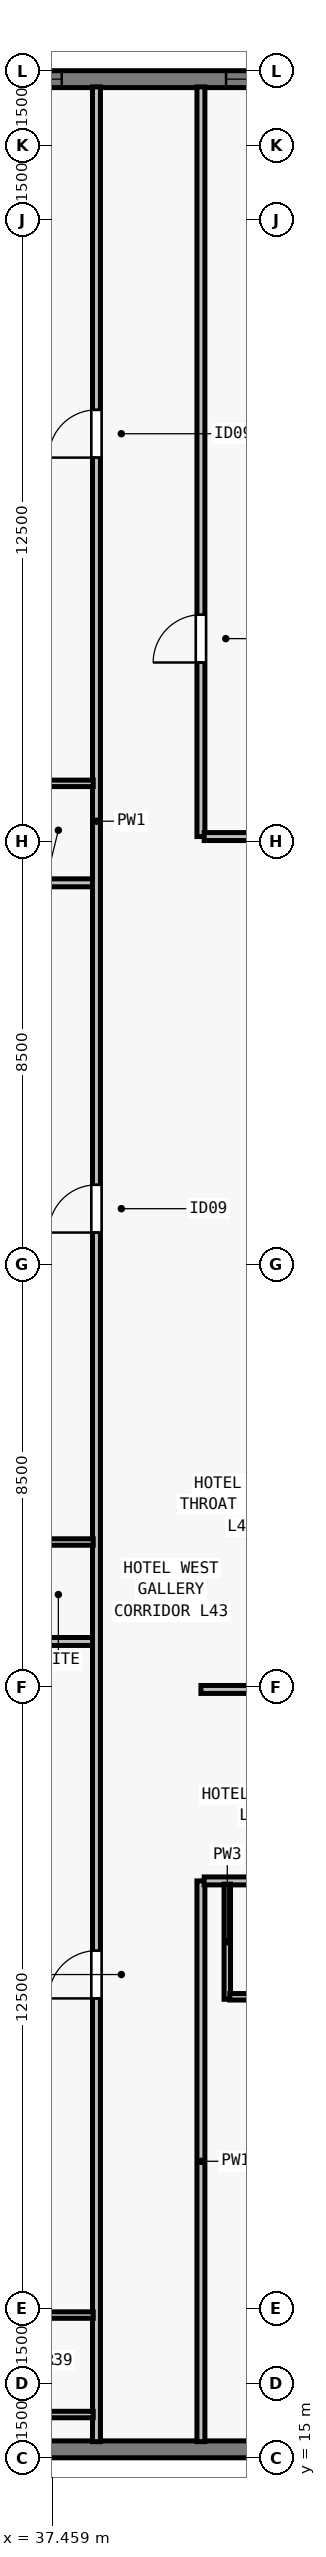
"""IFC4 building model, lengths in metres.
Left out: names, types, materials, properties, quantities, classifications, styles, units other than length and angle.
Written with IfcOpenShell. Run it as: python <this file> out.ifc"""

import sys

from ifc_helpers import new_model, si_unit, direction, frame, frame_2d, origin, place, context, subcontext, project, spatial, rectangle, extrude, element, fill, save


model = new_model("IFC4")
c1 = context("Model", 3, precision=1e-05, world=origin(), true_north=direction((0.0, 1.0)))
c2 = subcontext(c1, "Body", "Model", "MODEL_VIEW")
j1 = project(units=[si_unit("LENGTHUNIT", "METRE"), si_unit("PLANEANGLEUNIT", "RADIAN")], contexts=[c1])
p1 = place(None, origin())
s1 = spatial("IfcSite", under=j1, at=p1, CompositionType="ELEMENT")
p2 = place(p1, origin())
s2 = spatial("IfcBuilding", under=s1, at=p2, CompositionType="ELEMENT")
p3 = place(p2, frame((0.0, 0.0, 158.5)))
s3 = spatial("IfcBuildingStorey", under=s2, at=p3, CompositionType="ELEMENT", Elevation=158.5)
p4 = place(p3, frame((49.4, 15.17, 0.0), z_axis=(0.0, 0.0, 1.0), x_axis=(-1.0, 0.0, 0.0)))
e1 = element("IfcWall", 1, at=p4, inside=s3, PredefinedType="SOLIDWALL", context=c2, shape_type="SweptSolid", body=[
    extrude(rectangle(XDim=17.082, YDim=0.34, at=frame_2d((8.541, 0.0))), origin(), (0.0, 0.0, 1.0), 3.28),
])
p5 = place(p4, frame((6.566, 0.0, 0.8)))
e2 = element("IfcOpeningElement", 2, at=p5, cuts=e1, PredefinedType="OPENING", context=c2, shape_type="SweptSolid", body=[
    extrude(rectangle(XDim=1.35, YDim=1.66, at=frame_2d((0.675, 0.83))), frame((0.0, 0.18, 0.0), z_axis=(0.0, -1.0, 0.0), x_axis=(1.0, 0.0, 0.0)), (0.0, 0.0, 1.0), 0.36),
])
p6 = place(p4, frame((0.71, 0.0, 0.8)))
e3 = element("IfcOpeningElement", 3, at=p6, cuts=e1, PredefinedType="OPENING", context=c2, shape_type="SweptSolid", body=[
    extrude(rectangle(XDim=0.75, YDim=1.66, at=frame_2d((0.375, 0.83))), frame((0.0, 0.18, 0.0), z_axis=(0.0, -1.0, 0.0), x_axis=(1.0, 0.0, 0.0)), (0.0, 0.0, 1.0), 0.36),
])
p7 = place(p3, frame((32.0, 62.83, 0.0), z_axis=(0.0, 0.0, 1.0), x_axis=(1.0, 0.0, 0.0)))
e4 = element("IfcWall", 4, at=p7, inside=s3, PredefinedType="SOLIDWALL", context=c2, shape_type="SweptSolid", body=[
    extrude(rectangle(XDim=39.682, YDim=0.34, at=frame_2d((19.841, 0.0))), origin(), (0.0, 0.0, 1.0), 3.28),
])
p8 = place(p7, frame((3.902, 0.0, 0.8)))
e5 = element("IfcOpeningElement", 5, at=p8, cuts=e4, PredefinedType="OPENING", context=c2, shape_type="SweptSolid", body=[
    extrude(rectangle(XDim=1.75, YDim=1.66, at=frame_2d((0.875, 0.83))), frame((0.0, 0.18, 0.0), z_axis=(0.0, -1.0, 0.0), x_axis=(1.0, 0.0, 0.0)), (0.0, 0.0, 1.0), 0.36),
])
p9 = place(p7, frame((8.955, 0.0, 0.8)))
e6 = element("IfcOpeningElement", 6, at=p9, cuts=e4, PredefinedType="OPENING", context=c2, shape_type="SweptSolid", body=[
    extrude(rectangle(XDim=1.35, YDim=1.66, at=frame_2d((0.675, 0.83))), frame((0.0, 0.18, 0.0), z_axis=(0.0, -1.0, 0.0), x_axis=(1.0, 0.0, 0.0)), (0.0, 0.0, 1.0), 0.36),
])
p10 = place(p7, frame((11.859, 0.0, 0.8)))
e7 = element("IfcOpeningElement", 7, at=p10, cuts=e4, PredefinedType="OPENING", context=c2, shape_type="SweptSolid", body=[
    extrude(rectangle(XDim=1.75, YDim=1.66, at=frame_2d((0.875, 0.83))), frame((0.0, 0.18, 0.0), z_axis=(0.0, -1.0, 0.0), x_axis=(1.0, 0.0, 0.0)), (0.0, 0.0, 1.0), 0.36),
])
p11 = place(p7, frame((16.062, 0.0, 0.8)))
e8 = element("IfcOpeningElement", 8, at=p11, cuts=e4, PredefinedType="OPENING", context=c2, shape_type="SweptSolid", body=[
    extrude(rectangle(XDim=1.35, YDim=1.66, at=frame_2d((0.675, 0.83))), frame((0.0, 0.18, 0.0), z_axis=(0.0, -1.0, 0.0), x_axis=(1.0, 0.0, 0.0)), (0.0, 0.0, 1.0), 0.36),
])
p12 = place(p7, frame((18.966, 0.0, 0.8)))
e9 = element("IfcOpeningElement", 9, at=p12, cuts=e4, PredefinedType="OPENING", context=c2, shape_type="SweptSolid", body=[
    extrude(rectangle(XDim=1.75, YDim=1.66, at=frame_2d((0.875, 0.83))), frame((0.0, 0.18, 0.0), z_axis=(0.0, -1.0, 0.0), x_axis=(1.0, 0.0, 0.0)), (0.0, 0.0, 1.0), 0.36),
])
p13 = place(p7, frame((22.719, 0.0, 0.8)))
e10 = element("IfcOpeningElement", 10, at=p13, cuts=e4, PredefinedType="OPENING", context=c2, shape_type="SweptSolid", body=[
    extrude(rectangle(XDim=1.35, YDim=1.66, at=frame_2d((0.675, 0.83))), frame((0.0, 0.18, 0.0), z_axis=(0.0, -1.0, 0.0), x_axis=(1.0, 0.0, 0.0)), (0.0, 0.0, 1.0), 0.36),
])
p14 = place(p7, frame((26.073, 0.0, 0.8)))
e11 = element("IfcOpeningElement", 11, at=p14, cuts=e4, PredefinedType="OPENING", context=c2, shape_type="SweptSolid", body=[
    extrude(rectangle(XDim=1.75, YDim=1.66, at=frame_2d((0.875, 0.83))), frame((0.0, 0.18, 0.0), z_axis=(0.0, -1.0, 0.0), x_axis=(1.0, 0.0, 0.0)), (0.0, 0.0, 1.0), 0.36),
])
p15 = place(p7, frame((28.977, 0.0, 0.8)))
e12 = element("IfcOpeningElement", 12, at=p15, cuts=e4, PredefinedType="OPENING", context=c2, shape_type="SweptSolid", body=[
    extrude(rectangle(XDim=1.35, YDim=1.66, at=frame_2d((0.675, 0.83))), frame((0.0, 0.18, 0.0), z_axis=(0.0, -1.0, 0.0), x_axis=(1.0, 0.0, 0.0)), (0.0, 0.0, 1.0), 0.36),
])
p16 = place(p7, frame((33.18, 0.0, 0.8)))
e13 = element("IfcOpeningElement", 13, at=p16, cuts=e4, PredefinedType="OPENING", context=c2, shape_type="SweptSolid", body=[
    extrude(rectangle(XDim=1.75, YDim=1.66, at=frame_2d((0.875, 0.83))), frame((0.0, 0.18, 0.0), z_axis=(0.0, -1.0, 0.0), x_axis=(1.0, 0.0, 0.0)), (0.0, 0.0, 1.0), 0.36),
])
p17 = place(p3, frame((38.35, 15.325, 0.0), z_axis=(0.0, 0.0, 1.0), x_axis=(0.0, 1.0, 0.0)))
e14 = element("IfcWall", 14, at=p17, inside=s3, PredefinedType="PARTITIONING", context=c2, shape_type="SweptSolid", body=[
    extrude(rectangle(XDim=47.35, YDim=0.16, at=frame_2d((23.675, 0.0))), origin(), (0.0, 0.0, 1.0), 2.555),
])
p18 = place(p17, frame((8.912, 0.0, 0.0)))
e15 = element("IfcOpeningElement", 15, at=p18, cuts=e14, PredefinedType="OPENING", context=c2, shape_type="SweptSolid", body=[
    extrude(rectangle(XDim=0.96, YDim=2.15, at=frame_2d((0.48, 1.075))), frame((0.0, 0.09, 0.0), z_axis=(0.0, -1.0, 0.0), x_axis=(1.0, 0.0, 0.0)), (0.0, 0.0, 1.0), 0.18),
])
p19 = place(p17, frame((24.312, 0.0, 0.0)))
e16 = element("IfcOpeningElement", 16, at=p19, cuts=e14, PredefinedType="OPENING", context=c2, shape_type="SweptSolid", body=[
    extrude(rectangle(XDim=0.96, YDim=2.15, at=frame_2d((0.48, 1.075))), frame((0.0, 0.09, 0.0), z_axis=(0.0, -1.0, 0.0), x_axis=(1.0, 0.0, 0.0)), (0.0, 0.0, 1.0), 0.18),
])
p20 = place(p17, frame((39.895, 0.0, 0.0)))
e17 = element("IfcOpeningElement", 17, at=p20, cuts=e14, PredefinedType="OPENING", context=c2, shape_type="SweptSolid", body=[
    extrude(rectangle(XDim=0.96, YDim=2.15, at=frame_2d((0.48, 1.075))), frame((0.0, 0.09, 0.0), z_axis=(0.0, -1.0, 0.0), x_axis=(1.0, 0.0, 0.0)), (0.0, 0.0, 1.0), 0.18),
])
p21 = place(p3, frame((40.45, 15.325, 0.0), z_axis=(0.0, 0.0, 1.0), x_axis=(0.0, 1.0, 0.0)))
e18 = element("IfcWall", 18, at=p21, inside=s3, PredefinedType="PARTITIONING", context=c2, shape_type="SweptSolid", body=[
    extrude(rectangle(XDim=11.275, YDim=0.16, at=frame_2d((5.638, 0.0))), origin(), (0.0, 0.0, 1.0), 2.555),
])
p22 = place(p3, frame((40.45, 47.6, 0.0), z_axis=(0.0, 0.0, 1.0), x_axis=(0.0, 1.0, 0.0)))
e19 = element("IfcWall", 19, at=p22, inside=s3, PredefinedType="PARTITIONING", context=c2, shape_type="SweptSolid", body=[
    extrude(rectangle(XDim=15.075, YDim=0.16, at=frame_2d((7.538, 0.0))), origin(), (0.0, 0.0, 1.0), 2.555),
])
p23 = place(p22, frame((3.5, 0.0, 0.0)))
e20 = element("IfcOpeningElement", 20, at=p23, cuts=e19, PredefinedType="OPENING", context=c2, shape_type="SweptSolid", body=[
    extrude(rectangle(XDim=0.96, YDim=2.12, at=frame_2d((0.48, 1.06))), frame((0.0, 0.09, 0.0), z_axis=(0.0, -1.0, 0.0), x_axis=(1.0, 0.0, 0.0)), (0.0, 0.0, 1.0), 0.18),
])
p24 = place(p3, frame((40.45, 30.45, 0.0), z_axis=(0.0, 0.0, 1.0), x_axis=(1.0, 0.0, 0.0)))
e21 = element("IfcWall", 21, at=p24, inside=s3, PredefinedType="PARTITIONING", context=c2, shape_type="SweptSolid", body=[
    extrude(rectangle(XDim=2.785, YDim=0.16, at=frame_2d((1.393, 0.0))), origin(), (0.0, 0.0, 1.0), 3.28),
])
p25 = place(p3, frame((40.515, 47.6, 0.0), z_axis=(0.0, 0.0, 1.0), x_axis=(1.0, 0.0, 0.0)))
e22 = element("IfcWall", 22, at=p25, inside=s3, PredefinedType="PARTITIONING", context=c2, shape_type="SweptSolid", body=[
    extrude(rectangle(XDim=2.72, YDim=0.16, at=frame_2d((1.36, 0.0))), origin(), (0.0, 0.0, 1.0), 3.28),
])
p26 = place(p3, frame((40.515, 26.6, 0.0), z_axis=(0.0, 0.0, 1.0), x_axis=(1.0, 0.0, 0.0)))
e23 = element("IfcWall", 23, at=p26, inside=s3, PredefinedType="PARTITIONING", context=c2, shape_type="SweptSolid", body=[
    extrude(rectangle(XDim=22.07, YDim=0.16, at=frame_2d((11.035, 0.0))), origin(), (0.0, 0.0, 1.0), 3.28),
])
p27 = place(p26, frame((3.072, 0.0, 0.0)))
e24 = element("IfcOpeningElement", 24, at=p27, cuts=e23, PredefinedType="OPENING", context=c2, shape_type="SweptSolid", body=[
    extrude(rectangle(XDim=0.96, YDim=2.15, at=frame_2d((0.48, 1.075))), frame((0.0, 0.09, 0.0), z_axis=(0.0, -1.0, 0.0), x_axis=(1.0, 0.0, 0.0)), (0.0, 0.0, 1.0), 0.18),
])
p28 = place(p26, frame((5.362, 0.0, 0.0)))
e25 = element("IfcOpeningElement", 25, at=p28, cuts=e23, PredefinedType="OPENING", context=c2, shape_type="SweptSolid", body=[
    extrude(rectangle(XDim=0.96, YDim=2.15, at=frame_2d((0.48, 1.075))), frame((0.0, 0.09, 0.0), z_axis=(0.0, -1.0, 0.0), x_axis=(1.0, 0.0, 0.0)), (0.0, 0.0, 1.0), 0.18),
])
p29 = place(p26, frame((11.566, 0.0, 0.0)))
e26 = element("IfcOpeningElement", 26, at=p29, cuts=e23, PredefinedType="OPENING", context=c2, shape_type="SweptSolid", body=[
    extrude(rectangle(XDim=0.96, YDim=2.15, at=frame_2d((0.48, 1.075))), frame((0.0, 0.09, 0.0), z_axis=(0.0, -1.0, 0.0), x_axis=(1.0, 0.0, 0.0)), (0.0, 0.0, 1.0), 0.18),
])
p30 = place(p26, frame((14.178, 0.0, 0.0)))
e27 = element("IfcOpeningElement", 27, at=p30, cuts=e23, PredefinedType="OPENING", context=c2, shape_type="SweptSolid", body=[
    extrude(rectangle(XDim=0.96, YDim=2.15, at=frame_2d((0.48, 1.075))), frame((0.0, 0.09, 0.0), z_axis=(0.0, -1.0, 0.0), x_axis=(1.0, 0.0, 0.0)), (0.0, 0.0, 1.0), 0.18),
])
p31 = place(p26, frame((20.099, 0.0, 0.0)))
e28 = element("IfcOpeningElement", 28, at=p31, cuts=e23, PredefinedType="OPENING", context=c2, shape_type="SweptSolid", body=[
    extrude(rectangle(XDim=0.96, YDim=2.15, at=frame_2d((0.48, 1.075))), frame((0.0, 0.09, 0.0), z_axis=(0.0, -1.0, 0.0), x_axis=(1.0, 0.0, 0.0)), (0.0, 0.0, 1.0), 0.18),
])
p32 = place(p3, frame((40.98, 24.22, 0.0), z_axis=(0.0, 0.0, 1.0), x_axis=(0.0, 1.0, 0.0)))
e29 = element("IfcWall", 29, at=p32, inside=s3, PredefinedType="PLUMBINGWALL", context=c2, shape_type="SweptSolid", body=[
    extrude(rectangle(XDim=2.315, YDim=0.13, at=frame_2d((1.157, 0.0))), origin(), (0.0, 0.0, 1.0), 3.28),
])
p33 = place(p3, frame((41.03, 24.27, 0.0), z_axis=(0.0, 0.0, 1.0), x_axis=(1.0, 0.0, 0.0)))
e30 = element("IfcWall", 30, at=p33, inside=s3, PredefinedType="PLUMBINGWALL", context=c2, shape_type="SweptSolid", body=[
    extrude(rectangle(XDim=1.542, YDim=0.13, at=frame_2d((0.771, 0.0))), origin(), (0.0, 0.0, 1.0), 3.28),
])
p34 = place(p33, frame((0.361, 0.0, 0.0)))
e31 = element("IfcOpeningElement", 31, at=p34, cuts=e30, PredefinedType="OPENING", context=c2, shape_type="SweptSolid", body=[
    extrude(rectangle(XDim=0.82, YDim=2.1, at=frame_2d((0.41, 1.05))), frame((0.0, 0.075, 0.0), z_axis=(0.0, -1.0, 0.0), x_axis=(1.0, 0.0, 0.0)), (0.0, 0.0, 1.0), 0.15),
])
for number, where, z_axis, x_axis in (
    (32, (35.97, 15.87, 0.0), (0.0, 0.0, 1.0), (1.0, 0.0, 0.0)),
    (33, (35.97, 17.87, 0.0), (0.0, 0.0, 1.0), (1.0, 0.0, 0.0)),
):
    element("IfcWall", number, at=place(p3, frame(where, z_axis=z_axis, x_axis=x_axis)), inside=s3, PredefinedType="PLUMBINGWALL", context=c2, shape_type="SweptSolid", body=[
        extrude(rectangle(XDim=2.315, YDim=0.13, at=frame_2d((1.157, 0.0))), origin(), (0.0, 0.0, 1.0), 3.28),
    ])
p35 = place(p3, frame((28.325, 31.415, 0.0), z_axis=(0.0, 0.0, 1.0), x_axis=(1.0, 0.0, 0.0)))
e34 = element("IfcWall", 34, at=p35, inside=s3, PredefinedType="PARTITIONING", context=c2, shape_type="SweptSolid", body=[
    extrude(rectangle(XDim=9.945, YDim=0.16, at=frame_2d((4.973, 0.0))), origin(), (0.0, 0.0, 1.0), 3.28),
])
p36 = place(p3, frame((35.97, 33.415, 0.0), z_axis=(0.0, 0.0, 1.0), x_axis=(1.0, 0.0, 0.0)))
e35 = element("IfcWall", 35, at=p36, inside=s3, PredefinedType="PLUMBINGWALL", context=c2, shape_type="SweptSolid", body=[
    extrude(rectangle(XDim=2.315, YDim=0.13, at=frame_2d((1.157, 0.0))), origin(), (0.0, 0.0, 1.0), 3.28),
])
p37 = place(p3, frame((28.325, 46.67, 0.0), z_axis=(0.0, 0.0, 1.0), x_axis=(1.0, 0.0, 0.0)))
e36 = element("IfcWall", 36, at=p37, inside=s3, PredefinedType="PARTITIONING", context=c2, shape_type="SweptSolid", body=[
    extrude(rectangle(XDim=9.945, YDim=0.16, at=frame_2d((4.973, 0.0))), origin(), (0.0, 0.0, 1.0), 3.28),
])
p38 = place(p3, frame((35.97, 48.67, 0.0), z_axis=(0.0, 0.0, 1.0), x_axis=(1.0, 0.0, 0.0)))
e37 = element("IfcWall", 37, at=p38, inside=s3, PredefinedType="PLUMBINGWALL", context=c2, shape_type="SweptSolid", body=[
    extrude(rectangle(XDim=2.315, YDim=0.13, at=frame_2d((1.157, 0.0))), origin(), (0.0, 0.0, 1.0), 3.28),
])
p39 = place(p8, origin())
e38 = element("IfcWindow", 38, at=p39, inside=s3, PartitioningType="SINGLE_PANEL", PredefinedType="WINDOW", context=c2, shape_type="SweptSolid", body=[
    extrude(rectangle(XDim=1.75, YDim=1.66, at=frame_2d((0.875, 0.83))), frame((0.0, -0.05, 0.0), z_axis=(0.0, -1.0, 0.0), x_axis=(1.0, 0.0, 0.0)), (0.0, 0.0, 1.0), 0.06),
])
fill(e5, e38)
p40 = place(p9, origin())
e39 = element("IfcWindow", 39, at=p40, inside=s3, PartitioningType="SINGLE_PANEL", PredefinedType="WINDOW", context=c2, shape_type="SweptSolid", body=[
    extrude(rectangle(XDim=1.35, YDim=1.66, at=frame_2d((0.675, 0.83))), frame((0.0, -0.05, 0.0), z_axis=(0.0, -1.0, 0.0), x_axis=(1.0, 0.0, 0.0)), (0.0, 0.0, 1.0), 0.06),
])
fill(e6, e39)
p41 = place(p23, origin())
e40 = element("IfcDoor", 40, at=p41, inside=s3, OperationType="SINGLE_SWING_LEFT", PredefinedType="DOOR", context=c2, shape_type="SweptSolid", body=[
    extrude(rectangle(XDim=0.96, YDim=2.12, at=frame_2d((0.48, 1.06))), frame((0.0, 0.025, 0.0), z_axis=(0.0, -1.0, 0.0), x_axis=(1.0, 0.0, 0.0)), (0.0, 0.0, 1.0), 0.05),
])
fill(e20, e40)
p42 = place(p18, origin())
e41 = element("IfcDoor", 41, at=p42, inside=s3, OperationType="SINGLE_SWING_LEFT", PredefinedType="DOOR", context=c2, shape_type="SweptSolid", body=[
    extrude(rectangle(XDim=0.96, YDim=2.15, at=frame_2d((0.48, 1.075))), frame((0.0, 0.025, 0.0), z_axis=(0.0, -1.0, 0.0), x_axis=(1.0, 0.0, 0.0)), (0.0, 0.0, 1.0), 0.05),
])
fill(e15, e41)
p43 = place(p19, origin())
e42 = element("IfcDoor", 42, at=p43, inside=s3, OperationType="SINGLE_SWING_LEFT", PredefinedType="DOOR", context=c2, shape_type="SweptSolid", body=[
    extrude(rectangle(XDim=0.96, YDim=2.15, at=frame_2d((0.48, 1.075))), frame((0.0, 0.025, 0.0), z_axis=(0.0, -1.0, 0.0), x_axis=(1.0, 0.0, 0.0)), (0.0, 0.0, 1.0), 0.05),
])
fill(e16, e42)
p44 = place(p20, origin())
e43 = element("IfcDoor", 43, at=p44, inside=s3, OperationType="SINGLE_SWING_LEFT", PredefinedType="DOOR", context=c2, shape_type="SweptSolid", body=[
    extrude(rectangle(XDim=0.96, YDim=2.15, at=frame_2d((0.48, 1.075))), frame((0.0, 0.025, 0.0), z_axis=(0.0, -1.0, 0.0), x_axis=(1.0, 0.0, 0.0)), (0.0, 0.0, 1.0), 0.05),
])
fill(e17, e43)
save(model, sys.argv[1])
